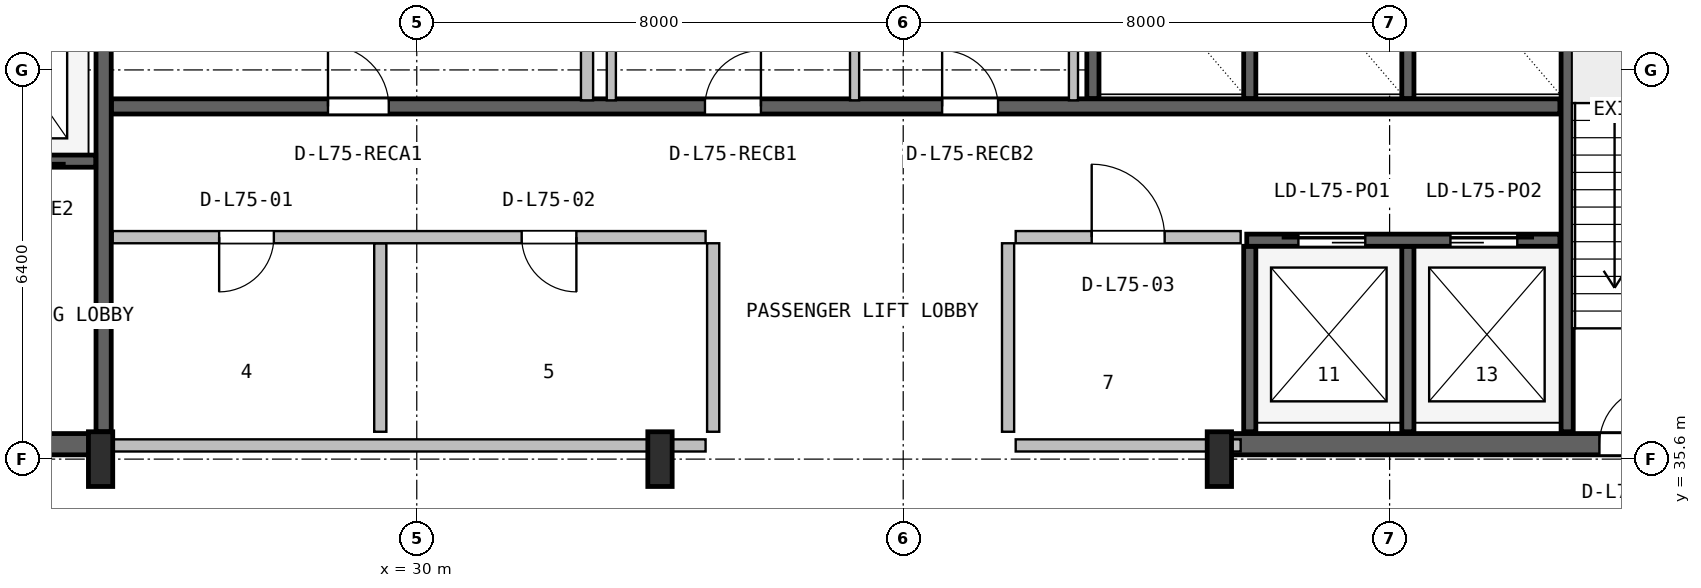
"""IFC4 building model, lengths in metres.
Left out: names, types, materials, properties, quantities, classifications, styles, units other than length and angle.
Written with IfcOpenShell. Run it as: python <this file> out.ifc"""

import sys

from ifc_helpers import new_model, si_unit, direction, frame, frame_2d, origin, origin_2d, place, context, subcontext, project, spatial, rectangle, i_section, extrude, source, transform, mapped, element, fill, save


model = new_model("IFC4")
c1 = context("Model", 3, precision=1e-05, world=origin(), true_north=direction((0.0, 1.0)))
c2 = subcontext(c1, "Body", "Model", "MODEL_VIEW")
j1 = project(units=[si_unit("LENGTHUNIT", "METRE"), si_unit("PLANEANGLEUNIT", "RADIAN")], contexts=[c1])
p1 = place(None, origin())
s1 = spatial("IfcSite", under=j1, at=p1, CompositionType="ELEMENT")
p2 = place(p1, origin())
s2 = spatial("IfcBuilding", under=s1, at=p2, CompositionType="ELEMENT")
p3 = place(p2, frame((0.0, 0.0, 300.2)))
s3 = spatial("IfcBuildingStorey", under=s2, at=p3, CompositionType="ELEMENT", Elevation=300.2)
p4 = place(p3, frame((15.67, 35.845, 0.0), z_axis=(0.0, 0.0, 1.0), x_axis=(1.0, 0.0, 0.0)))
e1 = element("IfcWall", 1, at=p4, inside=s3, PredefinedType="SHEAR", context=c2, shape_type="SweptSolid", body=[
    extrude(rectangle(XDim=9.13, YDim=0.35, at=frame_2d((4.565, 0.0))), origin(), (0.0, 0.0, 1.0), 4.52),
])
p5 = place(p4, frame((5.4, 0.0, 0.0)))
e2 = element("IfcOpeningElement", 2, at=p5, cuts=e1, PredefinedType="OPENING", context=c2, shape_type="SweptSolid", body=[
    extrude(rectangle(XDim=1.0, YDim=2.1, at=frame_2d((0.5, 1.05))), frame((0.0, 0.185, 0.0), z_axis=(0.0, -1.0, 0.0), x_axis=(1.0, 0.0, 0.0)), (0.0, 0.0, 1.0), 0.37),
])
p6 = place(p3, frame((43.2, 35.845, 0.0), z_axis=(0.0, 0.0, 1.0), x_axis=(1.0, 0.0, 0.0)))
e3 = element("IfcWall", 3, at=p6, inside=s3, PredefinedType="SHEAR", context=c2, shape_type="SweptSolid", body=[
    extrude(rectangle(XDim=9.13, YDim=0.35, at=frame_2d((4.565, 0.0))), origin(), (0.0, 0.0, 1.0), 4.52),
])
p7 = place(p6, frame((6.25, 0.0, 0.0)))
e4 = element("IfcOpeningElement", 4, at=p7, cuts=e3, PredefinedType="OPENING", context=c2, shape_type="SweptSolid", body=[
    extrude(rectangle(XDim=0.95, YDim=2.1, at=frame_2d((0.475, 1.05))), frame((0.0, 0.185, 0.0), z_axis=(0.0, -1.0, 0.0), x_axis=(1.0, 0.0, 0.0)), (0.0, 0.0, 1.0), 0.37),
])
m1 = source(origin(), c2, "Body", "SweptSolid", [
    extrude(i_section(OverallWidth=0.4, OverallDepth=0.9, WebThickness=0.016, FlangeThickness=0.028, FilletRadius=0.016, at=origin_2d()), origin(), (0.0, 0.0, 1.0), 4.8),
])
for number, where, z_axis, x_axis in (
    (5, (24.8, 35.6, 0.0), (0.0, 0.0, 1.0), (1.0, 0.0, 0.0)),
    (6, (34.0, 35.6, 0.0), (0.0, 0.0, 1.0), (1.0, 0.0, 0.0)),
    (7, (43.2, 35.6, 0.0), (0.0, 0.0, 1.0), (1.0, 0.0, 0.0)),
):
    element("IfcColumn", number, at=place(p3, frame(where, z_axis=z_axis, x_axis=x_axis)), inside=s3, PredefinedType="COLUMN", context=c2, shape_type="MappedRepresentation", body=[
        mapped(m1, transform((0.0, 0.0, 0.0), x_axis=(1.0, 0.0, 0.0), y_axis=(0.0, 1.0, 0.0), z_axis=(0.0, 0.0, 1.0), scale=1.0)),
    ])
p8 = place(p3, frame((24.85, 36.05, 0.0), z_axis=(0.0, 0.0, 1.0), x_axis=(0.0, 1.0, 0.0)))
e8 = element("IfcWall", 8, at=p8, inside=s3, PredefinedType="SHEAR", context=c2, shape_type="SweptSolid", body=[
    extrude(rectangle(XDim=10.45, YDim=0.25, at=frame_2d((5.225, 0.0))), origin(), (0.0, 0.0, 1.0), 4.52),
])
p9 = place(p3, frame((19.2, 40.5, 0.0), z_axis=(0.0, 0.0, 1.0), x_axis=(1.0, 0.0, 0.0)))
e9 = element("IfcWall", 9, at=p9, inside=s3, PredefinedType="SHEAR", context=c2, shape_type="SweptSolid", body=[
    extrude(rectangle(XDim=5.52, YDim=0.2, at=frame_2d((2.76, 0.0))), origin(), (0.0, 0.0, 1.0), 4.52),
])
p10 = place(p9, frame((1.05, 0.0, 0.0)))
e10 = element("IfcOpeningElement", 10, at=p10, cuts=e9, PredefinedType="OPENING", context=c2, shape_type="SweptSolid", body=[
    extrude(rectangle(XDim=1.1, YDim=2.18, at=frame_2d((0.55, 1.09))), frame((0.0, 0.11, 0.0), z_axis=(0.0, -1.0, 0.0), x_axis=(1.0, 0.0, 0.0)), (0.0, 0.0, 1.0), 0.22),
])
p11 = place(p9, frame((3.65, 0.0, 0.0)))
e11 = element("IfcOpeningElement", 11, at=p11, cuts=e9, PredefinedType="OPENING", context=c2, shape_type="SweptSolid", body=[
    extrude(rectangle(XDim=1.1, YDim=2.18, at=frame_2d((0.55, 1.09))), frame((0.0, 0.11, 0.0), z_axis=(0.0, -1.0, 0.0), x_axis=(1.0, 0.0, 0.0)), (0.0, 0.0, 1.0), 0.22),
])
p12 = place(p3, frame((48.92, 36.05, 0.0), z_axis=(0.0, 0.0, 1.0), x_axis=(0.0, 1.0, 0.0)))
e12 = element("IfcWall", 12, at=p12, inside=s3, PredefinedType="SHEAR", context=c2, shape_type="SweptSolid", body=[
    extrude(rectangle(XDim=10.5, YDim=0.2, at=frame_2d((5.25, 0.0))), origin(), (0.0, 0.0, 1.0), 4.52),
])
p13 = place(p3, frame((24.98, 41.4, 0.0), z_axis=(0.0, 0.0, 1.0), x_axis=(1.0, 0.0, 0.0)))
e13 = element("IfcWall", 13, at=p13, inside=s3, PredefinedType="SHEAR", context=c2, shape_type="SweptSolid", body=[
    extrude(rectangle(XDim=23.82, YDim=0.25, at=frame_2d((11.91, 0.0))), origin(), (0.0, 0.0, 1.0), 4.52),
])
p14 = place(p13, frame((3.56, 0.0, 0.0)))
e14 = element("IfcOpeningElement", 14, at=p14, cuts=e13, PredefinedType="OPENING", context=c2, shape_type="SweptSolid", body=[
    extrude(rectangle(XDim=1.0, YDim=2.08, at=frame_2d((0.5, 1.04))), frame((0.0, 0.135, 0.0), z_axis=(0.0, -1.0, 0.0), x_axis=(1.0, 0.0, 0.0)), (0.0, 0.0, 1.0), 0.27),
])
p15 = place(p13, frame((9.76, 0.0, 0.0)))
e15 = element("IfcOpeningElement", 15, at=p15, cuts=e13, PredefinedType="OPENING", context=c2, shape_type="SweptSolid", body=[
    extrude(rectangle(XDim=0.92, YDim=2.08, at=frame_2d((0.46, 1.04))), frame((0.0, 0.135, 0.0), z_axis=(0.0, -1.0, 0.0), x_axis=(1.0, 0.0, 0.0)), (0.0, 0.0, 1.0), 0.27),
])
p16 = place(p13, frame((13.66, 0.0, 0.0)))
e16 = element("IfcOpeningElement", 16, at=p16, cuts=e13, PredefinedType="OPENING", context=c2, shape_type="SweptSolid", body=[
    extrude(rectangle(XDim=0.92, YDim=2.08, at=frame_2d((0.46, 1.04))), frame((0.0, 0.135, 0.0), z_axis=(0.0, -1.0, 0.0), x_axis=(1.0, 0.0, 0.0)), (0.0, 0.0, 1.0), 0.27),
])
p17 = place(p3, frame((41.12, 41.53, 0.0), z_axis=(0.0, 0.0, 1.0), x_axis=(0.0, 1.0, 0.0)))
e17 = element("IfcWall", 17, at=p17, inside=s3, PredefinedType="SHEAR", context=c2, shape_type="SweptSolid", body=[
    extrude(rectangle(XDim=5.02, YDim=0.2, at=frame_2d((2.51, 0.0))), origin(), (0.0, 0.0, 1.0), 4.52),
])
for number, where, z_axis, x_axis in (
    (18, (43.7, 41.53, 0.0), (0.0, 0.0, 1.0), (0.0, 1.0, 0.0)),
    (19, (46.3, 41.53, 0.0), (0.0, 0.0, 1.0), (0.0, 1.0, 0.0)),
):
    element("IfcWall", number, at=place(p3, frame(where, z_axis=z_axis, x_axis=x_axis)), inside=s3, PredefinedType="SHEAR", context=c2, shape_type="SweptSolid", body=[
        extrude(rectangle(XDim=2.87, YDim=0.2, at=frame_2d((1.435, 0.0))), origin(), (0.0, 0.0, 1.0), 4.52),
    ])
for number, where, z_axis, x_axis in (
    (20, (43.7, 36.05, 0.0), (0.0, 0.0, 1.0), (0.0, 1.0, 0.0)),
    (21, (46.3, 36.05, 0.0), (0.0, 0.0, 1.0), (0.0, 1.0, 0.0)),
):
    element("IfcWall", number, at=place(p3, frame(where, z_axis=z_axis, x_axis=x_axis)), inside=s3, PredefinedType="SHEAR", context=c2, shape_type="SweptSolid", body=[
        extrude(rectangle(XDim=3.05, YDim=0.2, at=frame_2d((1.525, 0.0))), origin(), (0.0, 0.0, 1.0), 4.52),
    ])
p18 = place(p3, frame((43.65, 39.2, 0.0), z_axis=(0.0, 0.0, 1.0), x_axis=(1.0, 0.0, 0.0)))
e22 = element("IfcWall", 22, at=p18, inside=s3, PredefinedType="SHEAR", context=c2, shape_type="SweptSolid", body=[
    extrude(rectangle(XDim=5.15, YDim=0.2, at=frame_2d((2.575, 0.0))), origin(), (0.0, 0.0, 1.0), 4.52),
])
p19 = place(p18, frame((0.85, 0.0, 0.0)))
e23 = element("IfcOpeningElement", 23, at=p19, cuts=e22, PredefinedType="OPENING", context=c2, shape_type="SweptSolid", body=[
    extrude(rectangle(XDim=1.1, YDim=2.18, at=frame_2d((0.55, 1.09))), frame((0.0, 0.11, 0.0), z_axis=(0.0, -1.0, 0.0), x_axis=(1.0, 0.0, 0.0)), (0.0, 0.0, 1.0), 0.22),
])
p20 = place(p18, frame((3.35, 0.0, 0.0)))
e24 = element("IfcOpeningElement", 24, at=p20, cuts=e22, PredefinedType="OPENING", context=c2, shape_type="SweptSolid", body=[
    extrude(rectangle(XDim=1.1, YDim=2.18, at=frame_2d((0.55, 1.09))), frame((0.0, 0.11, 0.0), z_axis=(0.0, -1.0, 0.0), x_axis=(1.0, 0.0, 0.0)), (0.0, 0.0, 1.0), 0.22),
])
p21 = place(p3, frame((25.0, 35.825, 0.0), z_axis=(0.0, 0.0, 1.0), x_axis=(1.0, 0.0, 0.0)))
e25 = element("IfcWall", 25, at=p21, inside=s3, PredefinedType="PLUMBINGWALL", context=c2, shape_type="SweptSolid", body=[
    extrude(rectangle(XDim=9.75, YDim=0.2, at=frame_2d((4.875, 0.0))), origin(), (0.0, 0.0, 1.0), 3.545),
])
p22 = place(p3, frame((29.4, 36.05, 0.0), z_axis=(0.0, 0.0, 1.0), x_axis=(0.0, 1.0, 0.0)))
e26 = element("IfcWall", 26, at=p22, inside=s3, PredefinedType="PLUMBINGWALL", context=c2, shape_type="SweptSolid", body=[
    extrude(rectangle(XDim=3.1, YDim=0.2, at=frame_2d((1.55, 0.0))), origin(), (0.0, 0.0, 1.0), 4.5),
])
p23 = place(p3, frame((25.0, 39.25, 0.0), z_axis=(0.0, 0.0, 1.0), x_axis=(1.0, 0.0, 0.0)))
e27 = element("IfcWall", 27, at=p23, inside=s3, PredefinedType="PLUMBINGWALL", context=c2, shape_type="SweptSolid", body=[
    extrude(rectangle(XDim=9.75, YDim=0.2, at=frame_2d((4.875, 0.0))), origin(), (0.0, 0.0, 1.0), 4.5),
])
p24 = place(p23, frame((1.75, 0.0, 0.0)))
e28 = element("IfcOpeningElement", 28, at=p24, cuts=e27, PredefinedType="OPENING", context=c2, shape_type="SweptSolid", body=[
    extrude(rectangle(XDim=0.9, YDim=2.06, at=frame_2d((0.45, 1.03))), frame((0.0, 0.11, 0.0), z_axis=(0.0, -1.0, 0.0), x_axis=(1.0, 0.0, 0.0)), (0.0, 0.0, 1.0), 0.22),
])
p25 = place(p23, frame((6.725, 0.0, 0.0)))
e29 = element("IfcOpeningElement", 29, at=p25, cuts=e27, PredefinedType="OPENING", context=c2, shape_type="SweptSolid", body=[
    extrude(rectangle(XDim=0.9, YDim=2.06, at=frame_2d((0.45, 1.03))), frame((0.0, 0.11, 0.0), z_axis=(0.0, -1.0, 0.0), x_axis=(1.0, 0.0, 0.0)), (0.0, 0.0, 1.0), 0.22),
])
p26 = place(p3, frame((34.875, 36.05, 0.0), z_axis=(0.0, 0.0, 1.0), x_axis=(0.0, 1.0, 0.0)))
e30 = element("IfcWall", 30, at=p26, inside=s3, PredefinedType="PLUMBINGWALL", context=c2, shape_type="SweptSolid", body=[
    extrude(rectangle(XDim=3.1, YDim=0.2, at=frame_2d((1.55, 0.0))), origin(), (0.0, 0.0, 1.0), 4.5),
])
p27 = place(p3, frame((39.85, 35.825, 0.0), z_axis=(0.0, 0.0, 1.0), x_axis=(1.0, 0.0, 0.0)))
e31 = element("IfcWall", 31, at=p27, inside=s3, PredefinedType="SOLIDWALL", context=c2, shape_type="SweptSolid", body=[
    extrude(rectangle(XDim=3.7, YDim=0.2, at=frame_2d((1.85, 0.0))), origin(), (0.0, 0.0, 1.0), 3.545),
])
p28 = place(p3, frame((39.85, 39.25, 0.0), z_axis=(0.0, 0.0, 1.0), x_axis=(1.0, 0.0, 0.0)))
e32 = element("IfcWall", 32, at=p28, inside=s3, PredefinedType="SOLIDWALL", context=c2, shape_type="SweptSolid", body=[
    extrude(rectangle(XDim=3.7, YDim=0.2, at=frame_2d((1.85, 0.0))), origin(), (0.0, 0.0, 1.0), 4.5),
])
p29 = place(p28, frame((1.25, 0.0, 0.0)))
e33 = element("IfcOpeningElement", 33, at=p29, cuts=e32, PredefinedType="OPENING", context=c2, shape_type="SweptSolid", body=[
    extrude(rectangle(XDim=1.2, YDim=2.1, at=frame_2d((0.6, 1.05))), frame((0.0, 0.11, 0.0), z_axis=(0.0, -1.0, 0.0), x_axis=(1.0, 0.0, 0.0)), (0.0, 0.0, 1.0), 0.22),
])
p30 = place(p3, frame((39.725, 36.05, 0.0), z_axis=(0.0, 0.0, 1.0), x_axis=(0.0, 1.0, 0.0)))
e34 = element("IfcWall", 34, at=p30, inside=s3, PredefinedType="SOLIDWALL", context=c2, shape_type="SweptSolid", body=[
    extrude(rectangle(XDim=3.1, YDim=0.2, at=frame_2d((1.55, 0.0))), origin(), (0.0, 0.0, 1.0), 4.5),
])
p31 = place(p3, frame((32.8, 41.5, 0.0), z_axis=(0.0, 0.0, 1.0), x_axis=(0.0, 1.0, 0.0)))
e35 = element("IfcWall", 35, at=p31, inside=s3, PredefinedType="SOLIDWALL", context=c2, shape_type="SweptSolid", body=[
    extrude(rectangle(XDim=5.02, YDim=0.2, at=frame_2d((2.51, 0.0))), origin(), (0.0, 0.0, 1.0), 4.5),
])
p32 = place(p3, frame((37.2, 41.5, 0.0), z_axis=(0.0, 0.0, 1.0), x_axis=(0.0, 1.0, 0.0)))
e36 = element("IfcWall", 36, at=p32, inside=s3, PredefinedType="PARTITIONING", context=c2, shape_type="SweptSolid", body=[
    extrude(rectangle(XDim=2.325, YDim=0.15, at=frame_2d((1.163, 0.0))), origin(), (0.0, 0.0, 1.0), 4.5),
])
for number, where, z_axis, x_axis in (
    (37, (40.8, 41.5, 0.0), (0.0, 0.0, 1.0), (0.0, 1.0, 0.0)),
    (38, (33.2, 41.5, 0.0), (0.0, 0.0, 1.0), (0.0, 1.0, 0.0)),
):
    element("IfcWall", number, at=place(p3, frame(where, z_axis=z_axis, x_axis=x_axis)), inside=s3, PredefinedType="PARTITIONING", context=c2, shape_type="SweptSolid", body=[
        extrude(rectangle(XDim=5.02, YDim=0.15, at=frame_2d((2.51, 0.0))), origin(), (0.0, 0.0, 1.0), 4.5),
    ])
m2 = source(origin(), c2, "Body", "SweptSolid", [
    extrude(rectangle(XDim=0.95, YDim=2.1, at=frame_2d((0.475, 1.05))), frame((0.0, 0.025, 0.0), z_axis=(0.0, -1.0, 0.0), x_axis=(1.0, 0.0, 0.0)), (0.0, 0.0, 1.0), 0.05),
])
p33 = place(p7, origin())
e39 = element("IfcDoor", 39, at=p33, inside=s3, OperationType="SINGLE_SWING_RIGHT", PredefinedType="DOOR", context=c2, shape_type="MappedRepresentation", body=[
    mapped(m2, transform((0.0, 0.0, 0.0), x_axis=(1.0, 0.0, 0.0), y_axis=(0.0, 1.0, 0.0), z_axis=(0.0, 0.0, 1.0), scale=1.0)),
])
fill(e4, e39)
m3 = source(origin(), c2, "Body", "SweptSolid", [
    extrude(rectangle(XDim=1.0, YDim=2.08, at=frame_2d((0.5, 1.04))), frame((0.0, 0.025, 0.0), z_axis=(0.0, -1.0, 0.0), x_axis=(1.0, 0.0, 0.0)), (0.0, 0.0, 1.0), 0.05),
])
p34 = place(p14, origin())
e40 = element("IfcDoor", 40, at=p34, inside=s3, OperationType="SINGLE_SWING_LEFT", PredefinedType="DOOR", context=c2, shape_type="MappedRepresentation", body=[
    mapped(m3, transform((0.0, 0.0, 0.0), x_axis=(1.0, 0.0, 0.0), y_axis=(0.0, 1.0, 0.0), z_axis=(0.0, 0.0, 1.0), scale=1.0)),
])
fill(e14, e40)
m4 = source(origin(), c2, "Body", "SweptSolid", [
    extrude(rectangle(XDim=0.92, YDim=2.08, at=frame_2d((0.46, 1.04))), frame((0.0, 0.025, 0.0), z_axis=(0.0, -1.0, 0.0), x_axis=(1.0, 0.0, 0.0)), (0.0, 0.0, 1.0), 0.05),
])
p35 = place(p15, origin())
e41 = element("IfcDoor", 41, at=p35, inside=s3, OperationType="SINGLE_SWING_RIGHT", PredefinedType="DOOR", context=c2, shape_type="MappedRepresentation", body=[
    mapped(m4, transform((0.0, 0.0, 0.0), x_axis=(1.0, 0.0, 0.0), y_axis=(0.0, 1.0, 0.0), z_axis=(0.0, 0.0, 1.0), scale=1.0)),
])
fill(e15, e41)
p36 = place(p16, origin())
e42 = element("IfcDoor", 42, at=p36, inside=s3, OperationType="SINGLE_SWING_LEFT", PredefinedType="DOOR", context=c2, shape_type="MappedRepresentation", body=[
    mapped(m4, transform((0.0, 0.0, 0.0), x_axis=(1.0, 0.0, 0.0), y_axis=(0.0, 1.0, 0.0), z_axis=(0.0, 0.0, 1.0), scale=1.0)),
])
fill(e16, e42)
m5 = source(origin(), c2, "Body", "SweptSolid", [
    extrude(rectangle(XDim=1.1, YDim=2.18, at=frame_2d((0.55, 1.09))), frame((0.0, 0.025, 0.0), z_axis=(0.0, -1.0, 0.0), x_axis=(1.0, 0.0, 0.0)), (0.0, 0.0, 1.0), 0.05),
])
p37 = place(p19, origin())
e43 = element("IfcDoor", 43, at=p37, inside=s3, OperationType="SLIDING_TO_LEFT", PredefinedType="DOOR", context=c2, shape_type="MappedRepresentation", body=[
    mapped(m5, transform((0.0, 0.0, 0.0), x_axis=(1.0, 0.0, 0.0), y_axis=(0.0, 1.0, 0.0), z_axis=(0.0, 0.0, 1.0), scale=1.0)),
])
fill(e23, e43)
p38 = place(p20, origin())
e44 = element("IfcDoor", 44, at=p38, inside=s3, OperationType="SLIDING_TO_RIGHT", PredefinedType="DOOR", context=c2, shape_type="MappedRepresentation", body=[
    mapped(m5, transform((0.0, 0.0, 0.0), x_axis=(1.0, 0.0, 0.0), y_axis=(0.0, 1.0, 0.0), z_axis=(0.0, 0.0, 1.0), scale=1.0)),
])
fill(e24, e44)
m6 = source(origin(), c2, "Body", "SweptSolid", [
    extrude(rectangle(XDim=0.9, YDim=2.06, at=frame_2d((0.45, 1.03))), frame((0.0, 0.025, 0.0), z_axis=(0.0, -1.0, 0.0), x_axis=(1.0, 0.0, 0.0)), (0.0, 0.0, 1.0), 0.05),
])
p39 = place(p24, frame((0.9, 0.0, 0.0), z_axis=(0.0, 0.0, 1.0), x_axis=(-1.0, 0.0, 0.0)))
e45 = element("IfcDoor", 45, at=p39, inside=s3, OperationType="SINGLE_SWING_LEFT", PredefinedType="DOOR", context=c2, shape_type="MappedRepresentation", body=[
    mapped(m6, transform((0.0, 0.0, 0.0), x_axis=(1.0, 0.0, 0.0), y_axis=(0.0, 1.0, 0.0), z_axis=(0.0, 0.0, 1.0), scale=1.0)),
])
fill(e28, e45)
p40 = place(p25, frame((0.9, 0.0, 0.0), z_axis=(0.0, 0.0, 1.0), x_axis=(-1.0, 0.0, 0.0)))
e46 = element("IfcDoor", 46, at=p40, inside=s3, OperationType="SINGLE_SWING_RIGHT", PredefinedType="DOOR", context=c2, shape_type="MappedRepresentation", body=[
    mapped(m6, transform((0.0, 0.0, 0.0), x_axis=(1.0, 0.0, 0.0), y_axis=(0.0, 1.0, 0.0), z_axis=(0.0, 0.0, 1.0), scale=1.0)),
])
fill(e29, e46)
m7 = source(origin(), c2, "Body", "SweptSolid", [
    extrude(rectangle(XDim=1.2, YDim=2.1, at=frame_2d((0.6, 1.05))), frame((0.0, 0.025, 0.0), z_axis=(0.0, -1.0, 0.0), x_axis=(1.0, 0.0, 0.0)), (0.0, 0.0, 1.0), 0.05),
])
p41 = place(p29, origin())
e47 = element("IfcDoor", 47, at=p41, inside=s3, OperationType="SINGLE_SWING_LEFT", PredefinedType="DOOR", context=c2, shape_type="MappedRepresentation", body=[
    mapped(m7, transform((0.0, 0.0, 0.0), x_axis=(1.0, 0.0, 0.0), y_axis=(0.0, 1.0, 0.0), z_axis=(0.0, 0.0, 1.0), scale=1.0)),
])
fill(e33, e47)
save(model, sys.argv[1])
